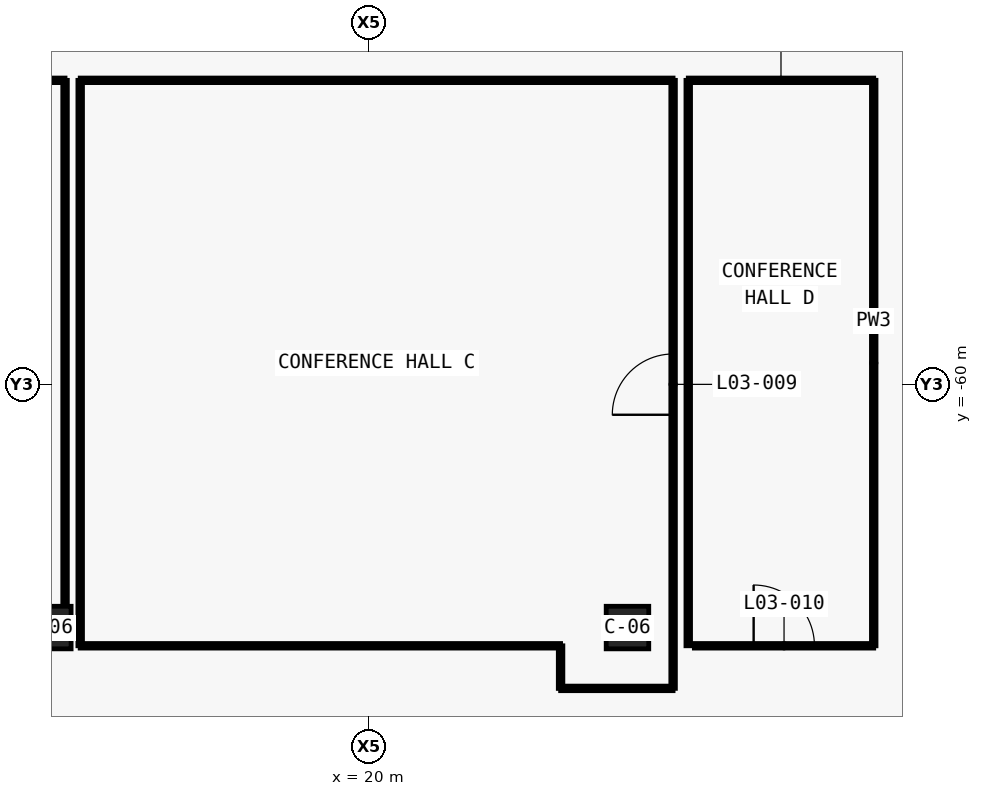
"""IFC4 building model, lengths in metres.
Left out: names, types, materials, properties, quantities, classifications, styles, units other than length and angle.
Written with IfcOpenShell. Run it as: python <this file> out.ifc"""

import sys

from ifc_helpers import new_model, si_unit, direction, frame, frame_2d, origin, origin_2d, place, context, subcontext, project, spatial, rectangle, extrude, element, fill, save


model = new_model("IFC4")
c1 = context("Model", 3, precision=1e-05, world=origin(), true_north=direction((0.0, 1.0)))
c2 = subcontext(c1, "Body", "Model", "MODEL_VIEW")
j1 = project(units=[si_unit("LENGTHUNIT", "METRE"), si_unit("PLANEANGLEUNIT", "RADIAN")], contexts=[c1])
p1 = place(None, origin())
s1 = spatial("IfcSite", under=j1, at=p1, CompositionType="ELEMENT")
p2 = place(p1, origin())
s2 = spatial("IfcBuilding", under=s1, at=p2, CompositionType="ELEMENT")
p3 = place(p2, frame((0.0, 0.0, 26.0)))
s3 = spatial("IfcBuildingStorey", under=s2, at=p3, CompositionType="ELEMENT", Elevation=26.0)
for number, where, z_axis, x_axis in (
    (1, (9.5, -68.0, 0.0), (0.0, 0.0, 1.0), (1.0, 0.0, 0.0)),
    (2, (28.5, -68.0, 0.0), (0.0, 0.0, 1.0), (1.0, 0.0, 0.0)),
):
    element("IfcColumn", number, at=place(p3, frame(where, z_axis=z_axis, x_axis=x_axis)), inside=s3, PredefinedType="COLUMN", context=c2, shape_type="SweptSolid", body=[
        extrude(rectangle(XDim=1.4, YDim=1.4, at=origin_2d()), origin(), (0.0, 0.0, 1.0), 6.0),
    ])
p4 = place(p3, frame((10.001, -67.28, 0.0), z_axis=(0.0, 0.0, 1.0), x_axis=(0.0, 1.0, 0.0)))
e3 = element("IfcWall", 3, at=p4, inside=s3, PredefinedType="PARTITIONING", context=c2, shape_type="SweptSolid", body=[
    extrude(rectangle(XDim=17.28, YDim=0.15, at=frame_2d((8.64, 0.0))), origin(), (0.0, 0.0, 1.0), 5.13),
])
p5 = place(p3, frame((10.0, -49.999, 0.0), z_axis=(0.0, 0.0, 1.0), x_axis=(-1.0, 0.0, 0.0)))
e4 = element("IfcWall", 4, at=p5, inside=s3, PredefinedType="PARTITIONING", context=c2, shape_type="SweptSolid", body=[
    extrude(rectangle(XDim=1.349, YDim=0.15, at=frame_2d((0.675, 0.0))), origin(), (0.0, 0.0, 1.0), 4.78),
])
p6 = place(p3, frame((26.301, -70.001, 0.0), z_axis=(0.0, 0.0, 1.0), x_axis=(1.0, 0.0, 0.0)))
e5 = element("IfcWall", 5, at=p6, inside=s3, PredefinedType="PARTITIONING", context=c2, shape_type="SweptSolid", body=[
    extrude(rectangle(XDim=3.699, YDim=0.15, at=frame_2d((1.85, 0.0))), origin(), (0.0, 0.0, 1.0), 4.78),
])
p7 = place(p3, frame((30.001, -70.0, 0.0), z_axis=(0.0, 0.0, 1.0), x_axis=(0.0, 1.0, 0.0)))
e6 = element("IfcWall", 6, at=p7, inside=s3, PredefinedType="PARTITIONING", context=c2, shape_type="SweptSolid", body=[
    extrude(rectangle(XDim=20.0, YDim=0.15, at=frame_2d((10.0, 0.0))), origin(), (0.0, 0.0, 1.0), 4.78),
])
p8 = place(p7, frame((9.0, 0.0, 0.0)))
e7 = element("IfcOpeningElement", 7, at=p8, cuts=e6, PredefinedType="OPENING", context=c2, shape_type="SweptSolid", body=[
    extrude(rectangle(XDim=2.0, YDim=2.4, at=frame_2d((1.0, 1.2))), frame((0.0, 0.085, 0.0), z_axis=(0.0, -1.0, 0.0), x_axis=(1.0, 0.0, 0.0)), (0.0, 0.0, 1.0), 0.17),
])
p9 = place(p3, frame((30.0, -49.999, 0.0), z_axis=(0.0, 0.0, 1.0), x_axis=(-1.0, 0.0, 0.0)))
e8 = element("IfcWall", 8, at=p9, inside=s3, PredefinedType="PARTITIONING", context=c2, shape_type="SweptSolid", body=[
    extrude(rectangle(XDim=19.5, YDim=0.15, at=frame_2d((9.75, 0.0))), origin(), (0.0, 0.0, 1.0), 4.78),
])
p10 = place(p3, frame((10.499, -50.0, 0.0), z_axis=(0.0, 0.0, 1.0), x_axis=(0.0, -1.0, 0.0)))
e9 = element("IfcWall", 9, at=p10, inside=s3, PredefinedType="PARTITIONING", context=c2, shape_type="SweptSolid", body=[
    extrude(rectangle(XDim=18.599, YDim=0.15, at=frame_2d((9.3, 0.0))), origin(), (0.0, 0.0, 1.0), 4.78),
])
p11 = place(p3, frame((36.599, -49.999, 0.0), z_axis=(0.0, 0.0, 1.0), x_axis=(-1.0, 0.0, 0.0)))
e10 = element("IfcWall", 10, at=p11, inside=s3, PredefinedType="PARTITIONING", context=c2, shape_type="SweptSolid", body=[
    extrude(rectangle(XDim=6.099, YDim=0.15, at=frame_2d((3.05, 0.0))), origin(), (0.0, 0.0, 1.0), 5.6),
])
p12 = place(p3, frame((30.499, -50.0, 0.0), z_axis=(0.0, 0.0, 1.0), x_axis=(0.0, -1.0, 0.0)))
e11 = element("IfcWall", 11, at=p12, inside=s3, PredefinedType="PARTITIONING", context=c2, shape_type="SweptSolid", body=[
    extrude(rectangle(XDim=18.599, YDim=0.15, at=frame_2d((9.3, 0.0))), origin(), (0.0, 0.0, 1.0), 4.78),
])
p13 = place(p3, frame((10.498, -68.6, 0.0), z_axis=(0.0, 0.0, 1.0), x_axis=(1.0, 0.0, 0.0)))
e12 = element("IfcWall", 12, at=p13, inside=s3, PredefinedType="PARTITIONING", context=c2, shape_type="SweptSolid", body=[
    extrude(rectangle(XDim=15.802, YDim=0.15, at=frame_2d((7.901, 0.0))), origin(), (0.0, 0.0, 1.0), 5.6),
])
p14 = place(p3, frame((26.3, -68.6, 0.0), z_axis=(0.0, 0.0, 1.0), x_axis=(0.0, -1.0, 0.0)))
e13 = element("IfcWall", 13, at=p14, inside=s3, PredefinedType="PARTITIONING", context=c2, shape_type="SweptSolid", body=[
    extrude(rectangle(XDim=1.402, YDim=0.15, at=frame_2d((0.701, 0.0))), origin(), (0.0, 0.0, 1.0), 5.6),
])
p15 = place(p3, frame((30.7, -68.6, 0.0), z_axis=(0.0, 0.0, 1.0), x_axis=(1.0, 0.0, 0.0)))
e14 = element("IfcWall", 14, at=p15, inside=s3, PredefinedType="PARTITIONING", context=c2, shape_type="SweptSolid", body=[
    extrude(rectangle(XDim=5.9, YDim=0.15, at=frame_2d((2.95, 0.0))), origin(), (0.0, 0.0, 1.0), 5.6),
])
p16 = place(p15, frame((1.95, 0.0, 0.0)))
e15 = element("IfcOpeningElement", 15, at=p16, cuts=e14, PredefinedType="OPENING", context=c2, shape_type="SweptSolid", body=[
    extrude(rectangle(XDim=2.0, YDim=2.4, at=frame_2d((1.0, 1.2))), frame((0.0, 0.085, 0.0), z_axis=(0.0, -1.0, 0.0), x_axis=(1.0, 0.0, 0.0)), (0.0, 0.0, 1.0), 0.17),
])
p17 = place(p3, frame((36.6, -68.6, 0.0), z_axis=(0.0, 0.0, 1.0), x_axis=(0.0, 1.0, 0.0)))
e16 = element("IfcWall", 16, at=p17, inside=s3, PredefinedType="PARTITIONING", context=c2, shape_type="SweptSolid", body=[
    extrude(rectangle(XDim=18.602, YDim=0.15, at=frame_2d((9.301, 0.0))), origin(), (0.0, 0.0, 1.0), 4.78),
])
p18 = place(p8, origin())
e17 = element("IfcDoor", 17, at=p18, inside=s3, OperationType="DOUBLE_DOOR_SINGLE_SWING", PredefinedType="DOOR", context=c2, shape_type="SweptSolid", body=[
    extrude(rectangle(XDim=2.0, YDim=2.4, at=frame_2d((1.0, 1.2))), frame((0.0, 0.025, 0.0), z_axis=(0.0, -1.0, 0.0), x_axis=(1.0, 0.0, 0.0)), (0.0, 0.0, 1.0), 0.05),
])
fill(e7, e17)
p19 = place(p16, origin())
e18 = element("IfcDoor", 18, at=p19, inside=s3, OperationType="DOUBLE_DOOR_SINGLE_SWING", PredefinedType="DOOR", context=c2, shape_type="SweptSolid", body=[
    extrude(rectangle(XDim=2.0, YDim=2.4, at=frame_2d((1.0, 1.2))), frame((0.0, 0.025, 0.0), z_axis=(0.0, -1.0, 0.0), x_axis=(1.0, 0.0, 0.0)), (0.0, 0.0, 1.0), 0.05),
])
fill(e15, e18)
save(model, sys.argv[1])
